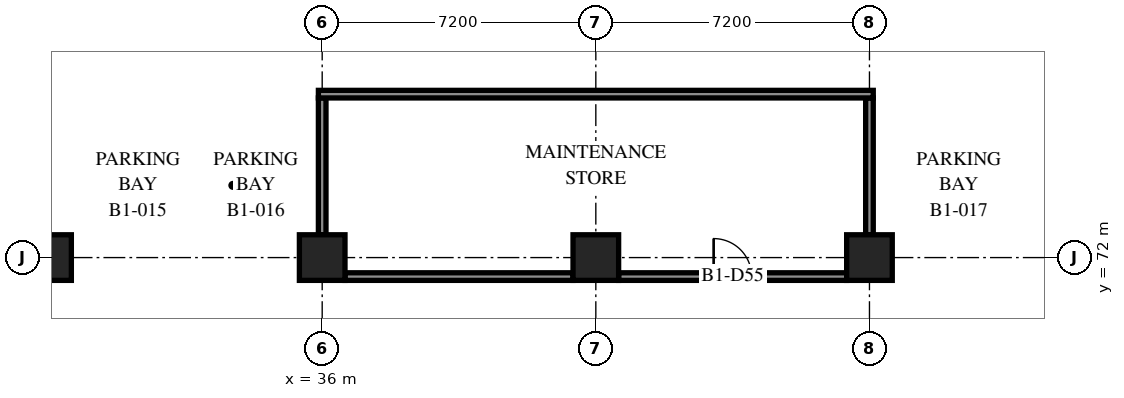
"""IFC4 building model, lengths in metres.
Left out: names, types, materials, properties, quantities, classifications, styles, units other than length and angle.
Written with IfcOpenShell. Run it as: python <this file> out.ifc"""

import sys

from ifc_helpers import new_model, si_unit, direction, frame, frame_2d, origin, origin_2d, place, context, subcontext, project, spatial, rectangle, extrude, element, fill, save


model = new_model("IFC4")
c1 = context("Model", 3, precision=1e-05, world=origin(), true_north=direction((0.0, 1.0)))
c2 = subcontext(c1, "Body", "Model", "MODEL_VIEW")
j1 = project(units=[si_unit("LENGTHUNIT", "METRE"), si_unit("PLANEANGLEUNIT", "RADIAN")], contexts=[c1])
p1 = place(None, origin())
s1 = spatial("IfcSite", under=j1, at=p1, CompositionType="ELEMENT")
p2 = place(p1, origin())
s2 = spatial("IfcBuilding", under=s1, at=p2, CompositionType="ELEMENT")
p3 = place(p2, frame((0.0, 0.0, -4.5)))
s3 = spatial("IfcBuildingStorey", under=s2, at=p3, CompositionType="ELEMENT", Elevation=-4.5)
for number, where, z_axis, x_axis in (
    (1, (28.8, 72.0, 0.0), (0.0, 0.0, 1.0), (1.0, 0.0, 0.0)),
    (2, (36.0, 72.0, 0.0), (0.0, 0.0, 1.0), (1.0, 0.0, 0.0)),
    (3, (43.2, 72.0, 0.0), (0.0, 0.0, 1.0), (1.0, 0.0, 0.0)),
    (4, (50.4, 72.0, 0.0), (0.0, 0.0, 1.0), (1.0, 0.0, 0.0)),
):
    element("IfcColumn", number, at=place(p3, frame(where, z_axis=z_axis, x_axis=x_axis)), inside=s3, PredefinedType="COLUMN", context=c2, shape_type="SweptSolid", body=[
        extrude(rectangle(XDim=1.2, YDim=1.2, at=origin_2d()), origin(), (0.0, 0.0, 1.0), 4.1),
    ])
for number, where, z_axis, x_axis in (
    (5, (36.0, 72.6, 0.0), (0.0, 0.0, 1.0), (0.0, 1.0, 0.0)),
    (6, (50.4, 72.6, 0.0), (0.0, 0.0, 1.0), (0.0, 1.0, 0.0)),
):
    element("IfcWall", number, at=place(p3, frame(where, z_axis=z_axis, x_axis=x_axis)), inside=s3, PredefinedType="PARTITIONING", context=c2, shape_type="SweptSolid", body=[
        extrude(rectangle(XDim=3.6, YDim=0.2, at=frame_2d((1.8, 0.0))), origin(), (0.0, 0.0, 1.0), 4.1),
    ])
p4 = place(p3, frame((36.6, 71.5, 0.0), z_axis=(0.0, 0.0, 1.0), x_axis=(1.0, 0.0, 0.0)))
e7 = element("IfcWall", 7, at=p4, inside=s3, PredefinedType="PARTITIONING", context=c2, shape_type="SweptSolid", body=[
    extrude(rectangle(XDim=6.0, YDim=0.2, at=frame_2d((3.0, 0.0))), origin(), (0.0, 0.0, 1.0), 4.1),
])
p5 = place(p3, frame((43.8, 71.5, 0.0), z_axis=(0.0, 0.0, 1.0), x_axis=(1.0, 0.0, 0.0)))
e8 = element("IfcWall", 8, at=p5, inside=s3, PredefinedType="PARTITIONING", context=c2, shape_type="SweptSolid", body=[
    extrude(rectangle(XDim=6.0, YDim=0.2, at=frame_2d((3.0, 0.0))), origin(), (0.0, 0.0, 1.0), 4.1),
])
p6 = place(p5, frame((2.5, 0.0, 0.0)))
e9 = element("IfcOpeningElement", 9, at=p6, cuts=e8, PredefinedType="OPENING", context=c2, shape_type="SweptSolid", body=[
    extrude(rectangle(XDim=1.0, YDim=2.1, at=frame_2d((0.5, 1.05))), frame((0.0, 0.11, 0.0), z_axis=(0.0, -1.0, 0.0), x_axis=(1.0, 0.0, 0.0)), (0.0, 0.0, 1.0), 0.22),
])
p7 = place(p3, frame((35.9, 76.3, 0.0), z_axis=(0.0, 0.0, 1.0), x_axis=(1.0, 0.0, 0.0)))
e10 = element("IfcWall", 10, at=p7, inside=s3, PredefinedType="PARTITIONING", context=c2, shape_type="SweptSolid", body=[
    extrude(rectangle(XDim=14.6, YDim=0.2, at=frame_2d((7.3, 0.0))), origin(), (0.0, 0.0, 1.0), 4.1),
])
p8 = place(p6, origin())
e11 = element("IfcDoor", 11, at=p8, inside=s3, OperationType="SINGLE_SWING_RIGHT", PredefinedType="DOOR", context=c2, shape_type="SweptSolid", body=[
    extrude(rectangle(XDim=1.0, YDim=2.1, at=frame_2d((0.5, 1.05))), frame((0.0, 0.025, 0.0), z_axis=(0.0, -1.0, 0.0), x_axis=(1.0, 0.0, 0.0)), (0.0, 0.0, 1.0), 0.05),
])
fill(e9, e11)
save(model, sys.argv[1])
